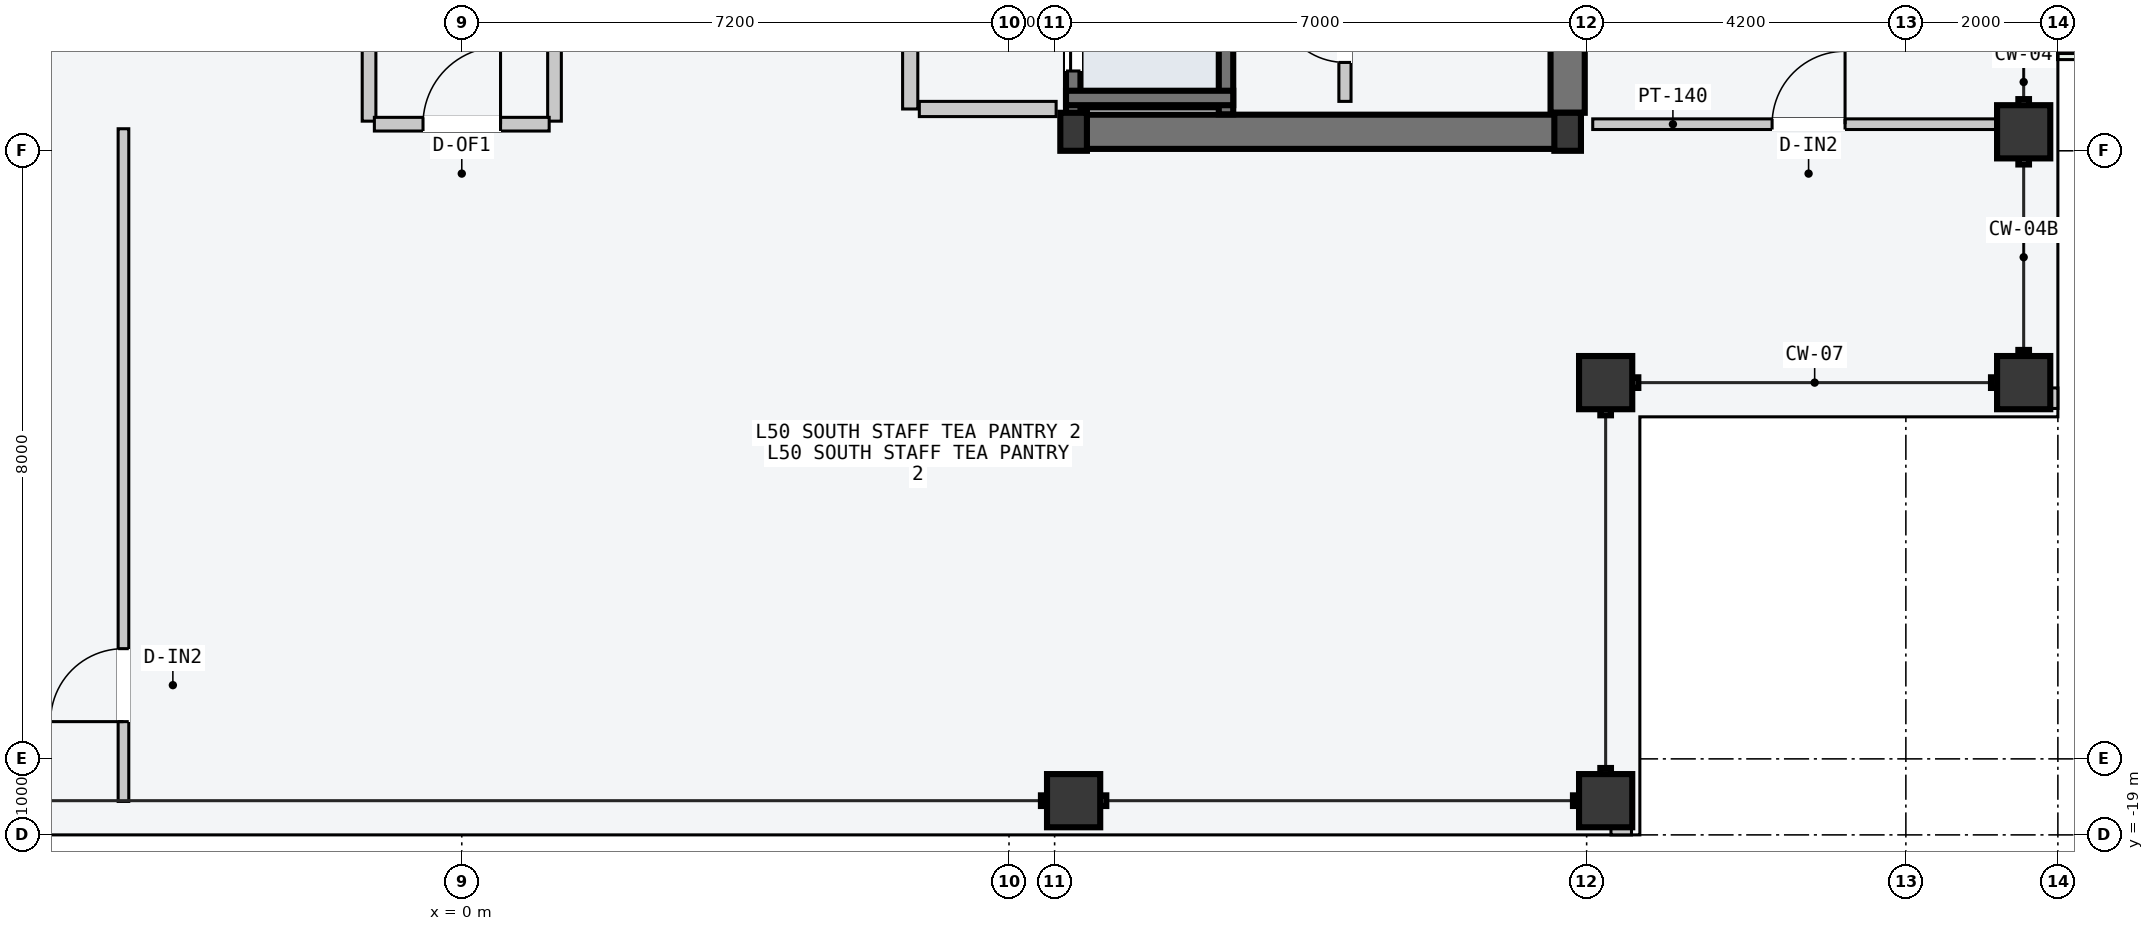
"""IFC4 building model, lengths in metres.
Left out: names, types, materials, properties, quantities, classifications, styles, units other than length and angle.
Written with IfcOpenShell. Run it as: python <this file> out.ifc"""

import sys

from ifc_helpers import new_model, si_unit, direction, frame, frame_2d, origin, origin_2d, place, context, subcontext, project, spatial, rectangle, hollow_rectangle, i_section, extrude, element, fill, save


model = new_model("IFC4")
c1 = context("Model", 3, precision=1e-05, world=origin(), true_north=direction((0.0, 1.0)))
c2 = subcontext(c1, "Body", "Model", "MODEL_VIEW")
j1 = project(units=[si_unit("LENGTHUNIT", "METRE"), si_unit("PLANEANGLEUNIT", "RADIAN")], contexts=[c1])
p1 = place(None, origin())
s1 = spatial("IfcSite", under=j1, at=p1, CompositionType="ELEMENT")
p2 = place(p1, origin())
s2 = spatial("IfcBuilding", under=s1, at=p2, CompositionType="ELEMENT")
p3 = place(p2, frame((0.0, 0.0, 191.1)))
s3 = spatial("IfcBuildingStorey", under=s2, at=p3, CompositionType="ELEMENT", Elevation=191.1)
p4 = place(p3, frame((8.07, -9.75, -0.2), z_axis=(0.0, 0.0, 1.0), x_axis=(1.0, 0.0, 0.0)))
e1 = element("IfcWall", 1, at=p4, inside=s3, PredefinedType="SHEAR", context=c2, shape_type="SweptSolid", body=[
    extrude(rectangle(XDim=6.46, YDim=0.45, at=frame_2d((3.23, 0.0))), origin(), (0.0, 0.0, 1.0), 3.6),
])
p5 = place(p3, frame((14.55, -9.5, -0.2), z_axis=(0.0, 0.0, 1.0), x_axis=(0.0, 1.0, 0.0)))
e2 = element("IfcWall", 2, at=p5, inside=s3, PredefinedType="SHEAR", context=c2, shape_type="SweptSolid", body=[
    extrude(rectangle(XDim=9.25, YDim=0.45, at=frame_2d((4.625, 0.0))), origin(), (0.0, 0.0, 1.0), 3.6),
])
for number, where, z_axis, x_axis in (
    (3, (8.05, -9.75, 0.0), (0.0, 0.0, 1.0), (1.0, 0.0, 0.0)),
    (4, (14.55, -9.75, 0.0), (0.0, 0.0, 1.0), (1.0, 0.0, 0.0)),
):
    element("IfcColumn", number, at=place(p3, frame(where, z_axis=z_axis, x_axis=x_axis)), inside=s3, PredefinedType="COLUMN", context=c2, shape_type="SweptSolid", body=[
        extrude(i_section(OverallWidth=0.35, OverallDepth=0.5, WebThickness=0.02, FlangeThickness=0.032, at=origin_2d()), origin(), (0.0, 0.0, 1.0), 3.6),
    ])
for number, where, z_axis, x_axis in (
    (5, (8.05, -18.55, 0.0), (0.0, 0.0, 1.0), (1.0, 0.0, 0.0)),
    (6, (15.05, -18.55, 0.0), (0.0, 0.0, 1.0), (1.0, 0.0, 0.0)),
    (7, (20.55, -13.05, 0.0), (0.0, 0.0, 1.0), (0.0, 1.0, 0.0)),
    (8, (20.55, -9.75, 0.0), (0.0, 0.0, 1.0), (0.0, 1.0, 0.0)),
    (9, (15.05, -13.05, 0.0), (0.0, 0.0, 1.0), (1.0, 0.0, 0.0)),
):
    element("IfcColumn", number, at=place(p3, frame(where, z_axis=z_axis, x_axis=x_axis)), inside=s3, PredefinedType="COLUMN", context=c2, shape_type="SweptSolid", body=[
        extrude(hollow_rectangle(XDim=0.7, YDim=0.7, WallThickness=0.03, at=origin_2d()), origin(), (0.0, 0.0, 1.0), 3.6),
    ])
p6 = place(p3, frame((20.86, -8.8, 0.0), z_axis=(0.0, 0.0, 1.0), x_axis=(0.0, 1.0, 0.0)))
e10 = element("IfcWall", 10, at=p6, inside=s3, PredefinedType="STANDARD", context=c2, shape_type="SweptSolid", body=[
    extrude(rectangle(XDim=10.8, YDim=0.25, at=frame_2d((5.4, 0.0))), origin(), (0.0, 0.0, 1.0), 3.4),
])
p7 = place(p6, frame((6.4, 0.0, 0.0)))
e11 = element("IfcOpeningElement", 11, at=p7, cuts=e10, PredefinedType="OPENING", context=c2, shape_type="SweptSolid", body=[
    extrude(rectangle(XDim=1.6, YDim=2.2, at=frame_2d((0.8, 1.1))), frame((0.0, 0.135, 0.0), z_axis=(0.0, -1.0, 0.0), x_axis=(1.0, 0.0, 0.0)), (0.0, 0.0, 1.0), 0.27),
])
p8 = place(p6, frame((2.0, 0.0, 0.85)))
e12 = element("IfcOpeningElement", 12, at=p8, cuts=e10, PredefinedType="OPENING", context=c2, shape_type="SweptSolid", body=[
    extrude(rectangle(XDim=2.0, YDim=2.1, at=frame_2d((1.0, 1.05))), frame((0.0, 0.135, 0.0), z_axis=(0.0, -1.0, 0.0), x_axis=(1.0, 0.0, 0.0)), (0.0, 0.0, 1.0), 0.27),
])
for number, where, z_axis, x_axis in (
    (13, (15.12, -18.89, 0.0), (0.0, 0.0, 1.0), (1.0, 0.0, 0.0)),
    (14, (20.89, -13.39, 0.0), (0.0, 0.0, 1.0), (0.0, 1.0, 0.0)),
):
    element("IfcWall", number, at=place(p3, frame(where, z_axis=z_axis, x_axis=x_axis)), inside=s3, PredefinedType="PARAPET", context=c2, shape_type="SweptSolid", body=[
        extrude(rectangle(XDim=0.27, YDim=0.22, at=frame_2d((0.135, 0.0))), origin(), (0.0, 0.0, 1.0), 1.2),
    ])
p9 = place(p3, frame((8.045, -9.52, -0.2), z_axis=(0.0, 0.0, 1.0), x_axis=(0.0, 1.0, 0.0)))
e15 = element("IfcWall", 15, at=p9, inside=s3, PredefinedType="SOLIDWALL", context=c2, shape_type="SweptSolid", body=[
    extrude(rectangle(XDim=2.12, YDim=0.19, at=frame_2d((1.06, 0.0))), origin(), (0.0, 0.0, 1.0), 3.6),
])
p10 = place(p9, frame((0.57, 0.0, 0.2)))
e16 = element("IfcOpeningElement", 16, at=p10, cuts=e15, PredefinedType="OPENING", context=c2, shape_type="SweptSolid", body=[
    extrude(rectangle(XDim=1.1, YDim=2.2, at=frame_2d((0.55, 1.1))), frame((0.0, 0.105, 0.0), z_axis=(0.0, -1.0, 0.0), x_axis=(1.0, 0.0, 0.0)), (0.0, 0.0, 1.0), 0.21),
])
p11 = place(p3, frame((10.055, -9.52, -0.2), z_axis=(0.0, 0.0, 1.0), x_axis=(0.0, 1.0, 0.0)))
e17 = element("IfcWall", 17, at=p11, inside=s3, PredefinedType="SOLIDWALL", context=c2, shape_type="SweptSolid", body=[
    extrude(rectangle(XDim=2.12, YDim=0.19, at=frame_2d((1.06, 0.0))), origin(), (0.0, 0.0, 1.0), 3.6),
])
p12 = place(p3, frame((7.95, -9.305, -0.2), z_axis=(0.0, 0.0, 1.0), x_axis=(1.0, 0.0, 0.0)))
e18 = element("IfcWall", 18, at=p12, inside=s3, PredefinedType="SOLIDWALL", context=c2, shape_type="SweptSolid", body=[
    extrude(rectangle(XDim=2.2, YDim=0.19, at=frame_2d((1.1, 0.0))), origin(), (0.0, 0.0, 1.0), 3.6),
])
p13 = place(p3, frame((5.9, -9.45, 0.0), z_axis=(0.0, 0.0, 1.0), x_axis=(0.0, 1.0, 0.0)))
e19 = element("IfcWall", 19, at=p13, inside=s3, PredefinedType="PARTITIONING", context=c2, shape_type="SweptSolid", body=[
    extrude(rectangle(XDim=10.5, YDim=0.2, at=frame_2d((5.25, 0.0))), origin(), (0.0, 0.0, 1.0), 3.4),
])
p14 = place(p13, frame((3.9, 0.0, 0.0)))
e20 = element("IfcOpeningElement", 20, at=p14, cuts=e19, PredefinedType="OPENING", context=c2, shape_type="SweptSolid", body=[
    extrude(rectangle(XDim=1.5, YDim=2.2, at=frame_2d((0.75, 1.1))), frame((0.0, 0.11, 0.0), z_axis=(0.0, -1.0, 0.0), x_axis=(1.0, 0.0, 0.0)), (0.0, 0.0, 1.0), 0.22),
])
p15 = place(p3, frame((6.02, -9.45, 0.0), z_axis=(0.0, 0.0, 1.0), x_axis=(1.0, 0.0, 0.0)))
e21 = element("IfcWall", 21, at=p15, inside=s3, PredefinedType="PARTITIONING", context=c2, shape_type="SweptSolid", body=[
    extrude(rectangle(XDim=1.8, YDim=0.2, at=frame_2d((0.9, 0.0))), origin(), (0.0, 0.0, 1.0), 3.4),
])
p16 = place(p3, frame((11.62, -9.35, 0.0), z_axis=(0.0, 0.0, 1.0), x_axis=(0.0, 1.0, 0.0)))
e22 = element("IfcWall", 22, at=p16, inside=s3, PredefinedType="PARTITIONING", context=c2, shape_type="SweptSolid", body=[
    extrude(rectangle(XDim=3.85, YDim=0.16, at=frame_2d((1.925, 0.0))), origin(), (0.0, 0.0, 1.0), 3.4),
])
p17 = place(p16, frame((0.512, 0.0, 0.0)))
e23 = element("IfcOpeningElement", 23, at=p17, cuts=e22, PredefinedType="OPENING", context=c2, shape_type="SweptSolid", body=[
    extrude(rectangle(XDim=0.9, YDim=2.15, at=frame_2d((0.45, 1.075))), frame((0.0, 0.09, 0.0), z_axis=(0.0, -1.0, 0.0), x_axis=(1.0, 0.0, 0.0)), (0.0, 0.0, 1.0), 0.18),
])
p18 = place(p16, frame((2.438, 0.0, 0.0)))
e24 = element("IfcOpeningElement", 24, at=p18, cuts=e22, PredefinedType="OPENING", context=c2, shape_type="SweptSolid", body=[
    extrude(rectangle(XDim=0.9, YDim=2.15, at=frame_2d((0.45, 1.075))), frame((0.0, 0.09, 0.0), z_axis=(0.0, -1.0, 0.0), x_axis=(1.0, 0.0, 0.0)), (0.0, 0.0, 1.0), 0.18),
])
p19 = place(p3, frame((-1.22, -9.61, 0.0), z_axis=(0.0, 0.0, 1.0), x_axis=(0.0, 1.0, 0.0)))
e25 = element("IfcWall", 25, at=p19, inside=s3, PredefinedType="PARTITIONING", context=c2, shape_type="SweptSolid", body=[
    extrude(rectangle(XDim=3.93, YDim=0.18, at=frame_2d((1.965, 0.0))), origin(), (0.0, 0.0, 1.0), 3.4),
])
p20 = place(p19, frame((1.15, 0.0, 0.0)))
e26 = element("IfcOpeningElement", 26, at=p20, cuts=e25, PredefinedType="OPENING", context=c2, shape_type="SweptSolid", body=[
    extrude(rectangle(XDim=0.96, YDim=2.18, at=frame_2d((0.48, 1.09))), frame((0.0, 0.1, 0.0), z_axis=(0.0, -1.0, 0.0), x_axis=(1.0, 0.0, 0.0)), (0.0, 0.0, 1.0), 0.2),
])
p21 = place(p3, frame((1.22, -9.61, 0.0), z_axis=(0.0, 0.0, 1.0), x_axis=(0.0, 1.0, 0.0)))
e27 = element("IfcWall", 27, at=p21, inside=s3, PredefinedType="PARTITIONING", context=c2, shape_type="SweptSolid", body=[
    extrude(rectangle(XDim=3.93, YDim=0.18, at=frame_2d((1.965, 0.0))), origin(), (0.0, 0.0, 1.0), 3.4),
])
p22 = place(p21, frame((1.15, 0.0, 0.0)))
e28 = element("IfcOpeningElement", 28, at=p22, cuts=e27, PredefinedType="OPENING", context=c2, shape_type="SweptSolid", body=[
    extrude(rectangle(XDim=0.96, YDim=2.18, at=frame_2d((0.48, 1.09))), frame((0.0, 0.1, 0.0), z_axis=(0.0, -1.0, 0.0), x_axis=(1.0, 0.0, 0.0)), (0.0, 0.0, 1.0), 0.2),
])
p23 = place(p3, frame((-4.451, -18.56, 0.0), z_axis=(0.0, 0.0, 1.0), x_axis=(0.0, 1.0, 0.0)))
e29 = element("IfcWall", 29, at=p23, inside=s3, PredefinedType="PARTITIONING", context=c2, shape_type="SweptSolid", body=[
    extrude(rectangle(XDim=8.85, YDim=0.14, at=frame_2d((4.425, 0.0))), origin(), (0.0, 0.0, 1.0), 3.4),
])
p24 = place(p23, frame((1.05, 0.0, 0.0)))
e30 = element("IfcOpeningElement", 30, at=p24, cuts=e29, PredefinedType="OPENING", context=c2, shape_type="SweptSolid", body=[
    extrude(rectangle(XDim=0.96, YDim=2.18, at=frame_2d((0.48, 1.09))), frame((0.0, 0.08, 0.0), z_axis=(0.0, -1.0, 0.0), x_axis=(1.0, 0.0, 0.0)), (0.0, 0.0, 1.0), 0.16),
])
p25 = place(p3, frame((-1.15, -9.65, 0.0), z_axis=(0.0, 0.0, 1.0), x_axis=(1.0, 0.0, 0.0)))
e31 = element("IfcWall", 31, at=p25, inside=s3, PredefinedType="PARTITIONING", context=c2, shape_type="SweptSolid", body=[
    extrude(rectangle(XDim=2.3, YDim=0.18, at=frame_2d((1.15, 0.0))), origin(), (0.0, 0.0, 1.0), 2.75),
])
p26 = place(p25, frame((0.64, 0.0, 0.0)))
e32 = element("IfcOpeningElement", 32, at=p26, cuts=e31, PredefinedType="OPENING", context=c2, shape_type="SweptSolid", body=[
    extrude(rectangle(XDim=1.02, YDim=2.2, at=frame_2d((0.51, 1.1))), frame((0.0, 0.1, 0.0), z_axis=(0.0, -1.0, 0.0), x_axis=(1.0, 0.0, 0.0)), (0.0, 0.0, 1.0), 0.2),
])
p27 = place(p3, frame((14.88, -9.65, 0.0), z_axis=(0.0, 0.0, 1.0), x_axis=(1.0, 0.0, 0.0)))
e33 = element("IfcWall", 33, at=p27, inside=s3, PredefinedType="PARTITIONING", context=c2, shape_type="SweptSolid", body=[
    extrude(rectangle(XDim=5.68, YDim=0.14, at=frame_2d((2.84, 0.0))), origin(), (0.0, 0.0, 1.0), 2.75),
])
p28 = place(p27, frame((2.36, 0.0, 0.0)))
e34 = element("IfcOpeningElement", 34, at=p28, cuts=e33, PredefinedType="OPENING", context=c2, shape_type="SweptSolid", body=[
    extrude(rectangle(XDim=0.96, YDim=2.18, at=frame_2d((0.48, 1.09))), frame((0.0, 0.08, 0.0), z_axis=(0.0, -1.0, 0.0), x_axis=(1.0, 0.0, 0.0)), (0.0, 0.0, 1.0), 0.16),
])
p29 = place(p10, origin())
e35 = element("IfcDoor", 35, at=p29, inside=s3, OperationType="SLIDING_TO_LEFT", PredefinedType="DOOR", context=c2, shape_type="SweptSolid", body=[
    extrude(rectangle(XDim=1.1, YDim=2.2, at=frame_2d((0.55, 1.1))), frame((0.0, 0.025, 0.0), z_axis=(0.0, -1.0, 0.0), x_axis=(1.0, 0.0, 0.0)), (0.0, 0.0, 1.0), 0.05),
])
fill(e16, e35)
p30 = place(p17, origin())
e36 = element("IfcDoor", 36, at=p30, inside=s3, OperationType="SINGLE_SWING_RIGHT", PredefinedType="DOOR", context=c2, shape_type="SweptSolid", body=[
    extrude(rectangle(XDim=0.9, YDim=2.15, at=frame_2d((0.45, 1.075))), frame((0.0, 0.025, 0.0), z_axis=(0.0, -1.0, 0.0), x_axis=(1.0, 0.0, 0.0)), (0.0, 0.0, 1.0), 0.05),
])
fill(e23, e36)
p31 = place(p24, origin())
e37 = element("IfcDoor", 37, at=p31, inside=s3, OperationType="SINGLE_SWING_LEFT", PredefinedType="DOOR", context=c2, shape_type="SweptSolid", body=[
    extrude(rectangle(XDim=0.96, YDim=2.18, at=frame_2d((0.48, 1.09))), frame((0.0, 0.025, 0.0), z_axis=(0.0, -1.0, 0.0), x_axis=(1.0, 0.0, 0.0)), (0.0, 0.0, 1.0), 0.05),
])
fill(e30, e37)
p32 = place(p26, origin())
e38 = element("IfcDoor", 38, at=p32, inside=s3, OperationType="SINGLE_SWING_RIGHT", PredefinedType="DOOR", context=c2, shape_type="SweptSolid", body=[
    extrude(rectangle(XDim=1.02, YDim=2.2, at=frame_2d((0.51, 1.1))), frame((0.0, 0.025, 0.0), z_axis=(0.0, -1.0, 0.0), x_axis=(1.0, 0.0, 0.0)), (0.0, 0.0, 1.0), 0.05),
])
fill(e32, e38)
p33 = place(p28, origin())
e39 = element("IfcDoor", 39, at=p33, inside=s3, OperationType="SINGLE_SWING_RIGHT", PredefinedType="DOOR", context=c2, shape_type="SweptSolid", body=[
    extrude(rectangle(XDim=0.96, YDim=2.18, at=frame_2d((0.48, 1.09))), frame((0.0, 0.025, 0.0), z_axis=(0.0, -1.0, 0.0), x_axis=(1.0, 0.0, 0.0)), (0.0, 0.0, 1.0), 0.05),
])
fill(e34, e39)
save(model, sys.argv[1])
